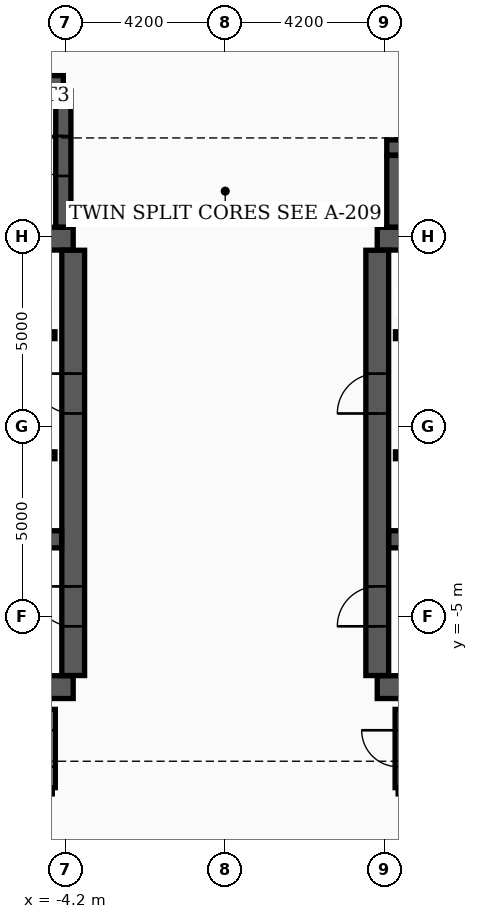
"""IFC4 building model, lengths in metres.
Left out: names, types, materials, properties, quantities, classifications, styles, units other than length and angle.
Written with IfcOpenShell. Run it as: python <this file> out.ifc"""

import sys

from ifc_helpers import new_model, si_unit, direction, frame, frame_2d, origin, place, context, subcontext, project, spatial, rectangle, extrude, element, fill, save


model = new_model("IFC4")
c1 = context("Model", 3, precision=1e-05, world=origin(), true_north=direction((0.0, 1.0)))
c2 = subcontext(c1, "Body", "Model", "MODEL_VIEW")
j1 = project(units=[si_unit("LENGTHUNIT", "METRE"), si_unit("PLANEANGLEUNIT", "RADIAN")], contexts=[c1])
p1 = place(None, origin())
s1 = spatial("IfcSite", under=j1, at=p1, CompositionType="ELEMENT")
p2 = place(p1, origin())
s2 = spatial("IfcBuilding", under=s1, at=p2, CompositionType="ELEMENT")
p3 = place(p2, frame((0.0, 0.0, 135.9)))
s3 = spatial("IfcBuildingStorey", under=s2, at=p3, CompositionType="ELEMENT", Elevation=135.9)
for number, where, z_axis, x_axis in (
    (1, (-12.4, -6.85, 0.0), (0.0, 0.0, 1.0), (1.0, 0.0, 0.0)),
    (2, (-12.4, 4.95, 0.0), (0.0, 0.0, 1.0), (1.0, 0.0, 0.0)),
):
    element("IfcWall", number, at=place(p3, frame(where, z_axis=z_axis, x_axis=x_axis)), inside=s3, PredefinedType="SHEAR", context=c2, shape_type="SweptSolid", body=[
        extrude(rectangle(XDim=8.4, YDim=0.6, at=frame_2d((4.2, 0.0))), origin(), (0.0, 0.0, 1.0), 3.7),
    ])
p4 = place(p3, frame((-4.0, -6.545, 0.0), z_axis=(0.0, 0.0, 1.0), x_axis=(0.0, 1.0, 0.0)))
e3 = element("IfcWall", 3, at=p4, inside=s3, PredefinedType="SHEAR", context=c2, shape_type="SweptSolid", body=[
    extrude(rectangle(XDim=11.19, YDim=0.6, at=frame_2d((5.595, 0.0))), origin(), (0.0, 0.0, 1.0), 3.7),
])
p5 = place(p4, frame((1.295, 0.0, 0.0)))
e4 = element("IfcOpeningElement", 4, at=p5, cuts=e3, PredefinedType="OPENING", context=c2, shape_type="SweptSolid", body=[
    extrude(rectangle(XDim=1.05, YDim=2.15, at=frame_2d((0.525, 1.075))), frame((0.0, 0.31, 0.0), z_axis=(0.0, -1.0, 0.0), x_axis=(1.0, 0.0, 0.0)), (0.0, 0.0, 1.0), 0.62),
])
p6 = place(p4, frame((6.895, 0.0, 0.0)))
e5 = element("IfcOpeningElement", 5, at=p6, cuts=e3, PredefinedType="OPENING", context=c2, shape_type="SweptSolid", body=[
    extrude(rectangle(XDim=1.05, YDim=2.15, at=frame_2d((0.525, 1.075))), frame((0.0, 0.31, 0.0), z_axis=(0.0, -1.0, 0.0), x_axis=(1.0, 0.0, 0.0)), (0.0, 0.0, 1.0), 0.62),
])
p7 = place(p3, frame((-12.095, -2.96, 0.0), z_axis=(0.0, 0.0, 1.0), x_axis=(1.0, 0.0, 0.0)))
e6 = element("IfcWall", 6, at=p7, inside=s3, PredefinedType="SHEAR", context=c2, shape_type="SweptSolid", body=[
    extrude(rectangle(XDim=7.79, YDim=0.45, at=frame_2d((3.895, 0.0))), origin(), (0.0, 0.0, 1.0), 3.7),
])
for number, where, z_axis, x_axis in (
    (7, (4.0, -6.85, 0.0), (0.0, 0.0, 1.0), (1.0, 0.0, 0.0)),
    (8, (4.0, 4.95, 0.0), (0.0, 0.0, 1.0), (1.0, 0.0, 0.0)),
):
    element("IfcWall", number, at=place(p3, frame(where, z_axis=z_axis, x_axis=x_axis)), inside=s3, PredefinedType="SHEAR", context=c2, shape_type="SweptSolid", body=[
        extrude(rectangle(XDim=8.4, YDim=0.6, at=frame_2d((4.2, 0.0))), origin(), (0.0, 0.0, 1.0), 3.7),
    ])
p8 = place(p3, frame((4.0, -6.545, 0.0), z_axis=(0.0, 0.0, 1.0), x_axis=(0.0, 1.0, 0.0)))
e9 = element("IfcWall", 9, at=p8, inside=s3, PredefinedType="SHEAR", context=c2, shape_type="SweptSolid", body=[
    extrude(rectangle(XDim=11.19, YDim=0.6, at=frame_2d((5.595, 0.0))), origin(), (0.0, 0.0, 1.0), 3.7),
])
p9 = place(p8, frame((1.295, 0.0, 0.0)))
e10 = element("IfcOpeningElement", 10, at=p9, cuts=e9, PredefinedType="OPENING", context=c2, shape_type="SweptSolid", body=[
    extrude(rectangle(XDim=1.05, YDim=2.15, at=frame_2d((0.525, 1.075))), frame((0.0, 0.31, 0.0), z_axis=(0.0, -1.0, 0.0), x_axis=(1.0, 0.0, 0.0)), (0.0, 0.0, 1.0), 0.62),
])
p10 = place(p8, frame((6.895, 0.0, 0.0)))
e11 = element("IfcOpeningElement", 11, at=p10, cuts=e9, PredefinedType="OPENING", context=c2, shape_type="SweptSolid", body=[
    extrude(rectangle(XDim=1.05, YDim=2.15, at=frame_2d((0.525, 1.075))), frame((0.0, 0.31, 0.0), z_axis=(0.0, -1.0, 0.0), x_axis=(1.0, 0.0, 0.0)), (0.0, 0.0, 1.0), 0.62),
])
p11 = place(p3, frame((4.305, -2.96, 0.0), z_axis=(0.0, 0.0, 1.0), x_axis=(1.0, 0.0, 0.0)))
e12 = element("IfcWall", 12, at=p11, inside=s3, PredefinedType="SHEAR", context=c2, shape_type="SweptSolid", body=[
    extrude(rectangle(XDim=7.79, YDim=0.45, at=frame_2d((3.895, 0.0))), origin(), (0.0, 0.0, 1.0), 3.7),
])
p12 = place(p3, frame((-12.22, 9.04, 0.0), z_axis=(0.0, 0.0, 1.0), x_axis=(1.0, 0.0, 0.0)))
e13 = element("IfcWall", 13, at=p12, inside=s3, PredefinedType="SHEAR", context=c2, shape_type="SweptSolid", body=[
    extrude(rectangle(XDim=7.96, YDim=0.4, at=frame_2d((3.98, 0.0))), origin(), (0.0, 0.0, 1.0), 3.7),
])
p13 = place(p3, frame((-4.26, 5.255, 0.0), z_axis=(0.0, 0.0, 1.0), x_axis=(0.0, 1.0, 0.0)))
e14 = element("IfcWall", 14, at=p13, inside=s3, PredefinedType="SHEAR", context=c2, shape_type="SweptSolid", body=[
    extrude(rectangle(XDim=3.58, YDim=0.4, at=frame_2d((1.79, 0.0))), origin(), (0.0, 0.0, 1.0), 3.7),
])
p14 = place(p13, frame((1.345, 0.0, 0.0)))
e15 = element("IfcOpeningElement", 15, at=p14, cuts=e14, PredefinedType="OPENING", context=c2, shape_type="SweptSolid", body=[
    extrude(rectangle(XDim=1.05, YDim=2.15, at=frame_2d((0.525, 1.075))), frame((0.0, 0.21, 0.0), z_axis=(0.0, -1.0, 0.0), x_axis=(1.0, 0.0, 0.0)), (0.0, 0.0, 1.0), 0.42),
])
p15 = place(p3, frame((4.45, 5.255, 0.0), z_axis=(0.0, 0.0, 1.0), x_axis=(0.0, 1.0, 0.0)))
e16 = element("IfcWall", 16, at=p15, inside=s3, PredefinedType="SHEAR", context=c2, shape_type="SweptSolid", body=[
    extrude(rectangle(XDim=1.885, YDim=0.4, at=frame_2d((0.942, 0.0))), origin(), (0.0, 0.0, 1.0), 3.7),
])
p16 = place(p3, frame((4.25, 7.35, 0.0), z_axis=(0.0, 0.0, 1.0), x_axis=(1.0, 0.0, 0.0)))
e17 = element("IfcWall", 17, at=p16, inside=s3, PredefinedType="SHEAR", context=c2, shape_type="SweptSolid", body=[
    extrude(rectangle(XDim=5.4, YDim=0.4, at=frame_2d((2.7, 0.0))), origin(), (0.0, 0.0, 1.0), 3.7),
])
p17 = place(p3, frame((-11.9, 2.41, 0.0), z_axis=(0.0, 0.0, 1.0), x_axis=(1.0, 0.0, 0.0)))
e18 = element("IfcWall", 18, at=p17, inside=s3, PredefinedType="SOLIDWALL", context=c2, shape_type="SweptSolid", body=[
    extrude(rectangle(XDim=7.42, YDim=0.18, at=frame_2d((3.71, 0.0))), origin(), (0.0, 0.0, 1.0), 2.96),
])
p18 = place(p17, frame((0.55, 0.0, 0.0)))
e19 = element("IfcOpeningElement", 19, at=p18, cuts=e18, PredefinedType="OPENING", context=c2, shape_type="SweptSolid", body=[
    extrude(rectangle(XDim=1.1, YDim=2.15, at=frame_2d((0.55, 1.075))), frame((0.0, 0.1, 0.0), z_axis=(0.0, -1.0, 0.0), x_axis=(1.0, 0.0, 0.0)), (0.0, 0.0, 1.0), 0.2),
])
p19 = place(p17, frame((4.9, 0.0, 0.0)))
e20 = element("IfcOpeningElement", 20, at=p19, cuts=e18, PredefinedType="OPENING", context=c2, shape_type="SweptSolid", body=[
    extrude(rectangle(XDim=0.88, YDim=2.1, at=frame_2d((0.44, 1.05))), frame((0.0, 0.1, 0.0), z_axis=(0.0, -1.0, 0.0), x_axis=(1.0, 0.0, 0.0)), (0.0, 0.0, 1.0), 0.2),
])
p20 = place(p3, frame((4.48, 2.41, 0.0), z_axis=(0.0, 0.0, 1.0), x_axis=(1.0, 0.0, 0.0)))
e21 = element("IfcWall", 21, at=p20, inside=s3, PredefinedType="SOLIDWALL", context=c2, shape_type="SweptSolid", body=[
    extrude(rectangle(XDim=7.42, YDim=0.18, at=frame_2d((3.71, 0.0))), origin(), (0.0, 0.0, 1.0), 2.96),
])
p21 = place(p20, frame((5.67, 0.0, 0.0)))
e22 = element("IfcOpeningElement", 22, at=p21, cuts=e21, PredefinedType="OPENING", context=c2, shape_type="SweptSolid", body=[
    extrude(rectangle(XDim=1.1, YDim=2.15, at=frame_2d((0.55, 1.075))), frame((0.0, 0.1, 0.0), z_axis=(0.0, -1.0, 0.0), x_axis=(1.0, 0.0, 0.0)), (0.0, 0.0, 1.0), 0.2),
])
p22 = place(p20, frame((1.6, 0.0, 0.0)))
e23 = element("IfcOpeningElement", 23, at=p22, cuts=e21, PredefinedType="OPENING", context=c2, shape_type="SweptSolid", body=[
    extrude(rectangle(XDim=0.88, YDim=2.1, at=frame_2d((0.44, 1.05))), frame((0.0, 0.1, 0.0), z_axis=(0.0, -1.0, 0.0), x_axis=(1.0, 0.0, 0.0)), (0.0, 0.0, 1.0), 0.2),
])
p23 = place(p3, frame((-11.9, -0.75, 0.0), z_axis=(0.0, 0.0, 1.0), x_axis=(1.0, 0.0, 0.0)))
e24 = element("IfcWall", 24, at=p23, inside=s3, PredefinedType="SOLIDWALL", context=c2, shape_type="SweptSolid", body=[
    extrude(rectangle(XDim=7.42, YDim=0.18, at=frame_2d((3.71, 0.0))), origin(), (0.0, 0.0, 1.0), 2.96),
])
p24 = place(p23, frame((0.45, 0.0, 0.0)))
e25 = element("IfcOpeningElement", 25, at=p24, cuts=e24, PredefinedType="OPENING", context=c2, shape_type="SweptSolid", body=[
    extrude(rectangle(XDim=1.1, YDim=2.15, at=frame_2d((0.55, 1.075))), frame((0.0, 0.1, 0.0), z_axis=(0.0, -1.0, 0.0), x_axis=(1.0, 0.0, 0.0)), (0.0, 0.0, 1.0), 0.2),
])
p25 = place(p23, frame((2.35, 0.0, 0.0)))
e26 = element("IfcOpeningElement", 26, at=p25, cuts=e24, PredefinedType="OPENING", context=c2, shape_type="SweptSolid", body=[
    extrude(rectangle(XDim=1.1, YDim=2.15, at=frame_2d((0.55, 1.075))), frame((0.0, 0.1, 0.0), z_axis=(0.0, -1.0, 0.0), x_axis=(1.0, 0.0, 0.0)), (0.0, 0.0, 1.0), 0.2),
])
p26 = place(p3, frame((4.48, -0.75, 0.0), z_axis=(0.0, 0.0, 1.0), x_axis=(1.0, 0.0, 0.0)))
e27 = element("IfcWall", 27, at=p26, inside=s3, PredefinedType="SOLIDWALL", context=c2, shape_type="SweptSolid", body=[
    extrude(rectangle(XDim=7.42, YDim=0.18, at=frame_2d((3.71, 0.0))), origin(), (0.0, 0.0, 1.0), 2.96),
])
p27 = place(p26, frame((0.52, 0.0, 0.0)))
e28 = element("IfcOpeningElement", 28, at=p27, cuts=e27, PredefinedType="OPENING", context=c2, shape_type="SweptSolid", body=[
    extrude(rectangle(XDim=1.1, YDim=2.15, at=frame_2d((0.55, 1.075))), frame((0.0, 0.1, 0.0), z_axis=(0.0, -1.0, 0.0), x_axis=(1.0, 0.0, 0.0)), (0.0, 0.0, 1.0), 0.2),
])
p28 = place(p3, frame((4.55, -9.58, 0.0), z_axis=(0.0, 0.0, 1.0), x_axis=(1.0, 0.0, 0.0)))
e29 = element("IfcWall", 29, at=p28, inside=s3, PredefinedType="PARTITIONING", context=c2, shape_type="SweptSolid", body=[
    extrude(rectangle(XDim=8.1, YDim=0.16, at=frame_2d((4.05, 0.0))), origin(), (0.0, 0.0, 1.0), 2.96),
])
p29 = place(p3, frame((4.55, -9.495, 0.0), z_axis=(0.0, 0.0, 1.0), x_axis=(0.0, 1.0, 0.0)))
e30 = element("IfcWall", 30, at=p29, inside=s3, PredefinedType="PARTITIONING", context=c2, shape_type="SweptSolid", body=[
    extrude(rectangle(XDim=2.06, YDim=0.16, at=frame_2d((1.03, 0.0))), origin(), (0.0, 0.0, 1.0), 2.96),
])
p30 = place(p29, frame((0.55, 0.0, 0.0)))
e31 = element("IfcOpeningElement", 31, at=p30, cuts=e30, PredefinedType="OPENING", context=c2, shape_type="SweptSolid", body=[
    extrude(rectangle(XDim=0.96, YDim=2.15, at=frame_2d((0.48, 1.075))), frame((0.0, 0.09, 0.0), z_axis=(0.0, -1.0, 0.0), x_axis=(1.0, 0.0, 0.0)), (0.0, 0.0, 1.0), 0.18),
])
p31 = place(p3, frame((-4.55, -9.495, 0.0), z_axis=(0.0, 0.0, 1.0), x_axis=(0.0, 1.0, 0.0)))
e32 = element("IfcWall", 32, at=p31, inside=s3, PredefinedType="PARTITIONING", context=c2, shape_type="SweptSolid", body=[
    extrude(rectangle(XDim=2.06, YDim=0.16, at=frame_2d((1.03, 0.0))), origin(), (0.0, 0.0, 1.0), 2.96),
])
p32 = place(p31, frame((0.55, 0.0, 0.0)))
e33 = element("IfcOpeningElement", 33, at=p32, cuts=e32, PredefinedType="OPENING", context=c2, shape_type="SweptSolid", body=[
    extrude(rectangle(XDim=0.96, YDim=2.15, at=frame_2d((0.48, 1.075))), frame((0.0, 0.09, 0.0), z_axis=(0.0, -1.0, 0.0), x_axis=(1.0, 0.0, 0.0)), (0.0, 0.0, 1.0), 0.18),
])
p33 = place(p5, origin())
e34 = element("IfcDoor", 34, at=p33, inside=s3, OperationType="SINGLE_SWING_RIGHT", PredefinedType="DOOR", context=c2, shape_type="SweptSolid", body=[
    extrude(rectangle(XDim=1.05, YDim=2.15, at=frame_2d((0.525, 1.075))), frame((0.0, 0.025, 0.0), z_axis=(0.0, -1.0, 0.0), x_axis=(1.0, 0.0, 0.0)), (0.0, 0.0, 1.0), 0.05),
])
fill(e4, e34)
p34 = place(p9, origin())
e35 = element("IfcDoor", 35, at=p34, inside=s3, OperationType="SINGLE_SWING_LEFT", PredefinedType="DOOR", context=c2, shape_type="SweptSolid", body=[
    extrude(rectangle(XDim=1.05, YDim=2.15, at=frame_2d((0.525, 1.075))), frame((0.0, 0.025, 0.0), z_axis=(0.0, -1.0, 0.0), x_axis=(1.0, 0.0, 0.0)), (0.0, 0.0, 1.0), 0.05),
])
fill(e10, e35)
p35 = place(p6, origin())
e36 = element("IfcDoor", 36, at=p35, inside=s3, OperationType="SINGLE_SWING_RIGHT", PredefinedType="DOOR", context=c2, shape_type="SweptSolid", body=[
    extrude(rectangle(XDim=1.05, YDim=2.15, at=frame_2d((0.525, 1.075))), frame((0.0, 0.025, 0.0), z_axis=(0.0, -1.0, 0.0), x_axis=(1.0, 0.0, 0.0)), (0.0, 0.0, 1.0), 0.05),
])
fill(e5, e36)
p36 = place(p10, origin())
e37 = element("IfcDoor", 37, at=p36, inside=s3, OperationType="SINGLE_SWING_LEFT", PredefinedType="DOOR", context=c2, shape_type="SweptSolid", body=[
    extrude(rectangle(XDim=1.05, YDim=2.15, at=frame_2d((0.525, 1.075))), frame((0.0, 0.025, 0.0), z_axis=(0.0, -1.0, 0.0), x_axis=(1.0, 0.0, 0.0)), (0.0, 0.0, 1.0), 0.05),
])
fill(e11, e37)
p37 = place(p14, origin())
e38 = element("IfcDoor", 38, at=p37, inside=s3, OperationType="SINGLE_SWING_RIGHT", PredefinedType="DOOR", context=c2, shape_type="SweptSolid", body=[
    extrude(rectangle(XDim=1.05, YDim=2.15, at=frame_2d((0.525, 1.075))), frame((0.0, 0.025, 0.0), z_axis=(0.0, -1.0, 0.0), x_axis=(1.0, 0.0, 0.0)), (0.0, 0.0, 1.0), 0.05),
])
fill(e15, e38)
p38 = place(p30, origin())
e39 = element("IfcDoor", 39, at=p38, inside=s3, OperationType="SINGLE_SWING_RIGHT", PredefinedType="DOOR", context=c2, shape_type="SweptSolid", body=[
    extrude(rectangle(XDim=0.96, YDim=2.15, at=frame_2d((0.48, 1.075))), frame((0.0, 0.025, 0.0), z_axis=(0.0, -1.0, 0.0), x_axis=(1.0, 0.0, 0.0)), (0.0, 0.0, 1.0), 0.05),
])
fill(e31, e39)
p39 = place(p32, origin())
e40 = element("IfcDoor", 40, at=p39, inside=s3, OperationType="SINGLE_SWING_LEFT", PredefinedType="DOOR", context=c2, shape_type="SweptSolid", body=[
    extrude(rectangle(XDim=0.96, YDim=2.15, at=frame_2d((0.48, 1.075))), frame((0.0, 0.025, 0.0), z_axis=(0.0, -1.0, 0.0), x_axis=(1.0, 0.0, 0.0)), (0.0, 0.0, 1.0), 0.05),
])
fill(e33, e40)
save(model, sys.argv[1])
